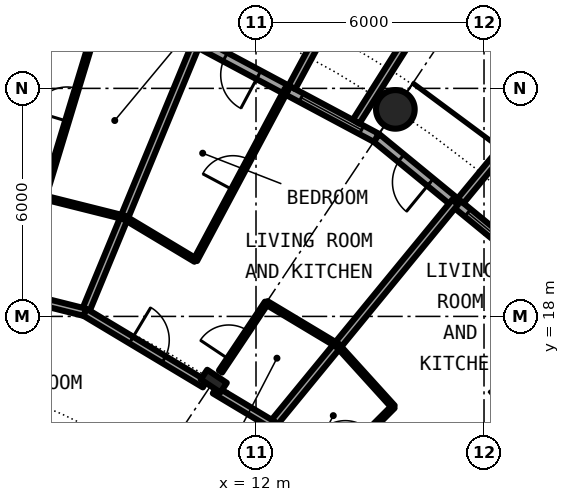
"""IFC4 building model, lengths in metres.
Left out: names, types, materials, properties, quantities, classifications, styles, units other than length and angle.
Written with IfcOpenShell. Run it as: python <this file> out.ifc"""

import sys

from ifc_helpers import new_model, si_unit, direction, frame, frame_2d, origin, origin_2d, place, context, subcontext, project, spatial, rectangle, hollow_circle, i_section, extrude, element, fill, save


model = new_model("IFC4")
c1 = context("Model", 3, precision=1e-05, world=origin(), true_north=direction((0.0, 1.0)))
c2 = subcontext(c1, "Body", "Model", "MODEL_VIEW")
j1 = project(units=[si_unit("LENGTHUNIT", "METRE"), si_unit("PLANEANGLEUNIT", "RADIAN")], contexts=[c1])
p1 = place(None, origin())
s1 = spatial("IfcSite", under=j1, at=p1, CompositionType="ELEMENT")
p2 = place(p1, origin())
s2 = spatial("IfcBuilding", under=s1, at=p2, CompositionType="ELEMENT")
p3 = place(p2, frame((0.0, 0.0, 28.9)))
s3 = spatial("IfcBuildingStorey", under=s2, at=p3, CompositionType="ELEMENT", Elevation=28.9)
p4 = place(p3, frame((15.667, 23.448, 0.0), z_axis=(0.0, 0.0, 1.0), x_axis=(1.0, 0.0, 0.0)))
e1 = element("IfcColumn", 1, at=p4, inside=s3, PredefinedType="COLUMN", context=c2, shape_type="SweptSolid", body=[
    extrude(hollow_circle(Radius=0.508, WallThickness=0.05, at=origin_2d()), origin(), (0.0, 0.0, 1.0), 3.05),
])
p5 = place(p3, frame((10.889, 16.297, 0.0), z_axis=(0.0, 0.0, 1.0), x_axis=(0.55557023302, 0.831469612303, 0.0)))
e2 = element("IfcColumn", 2, at=p5, inside=s3, PredefinedType="COLUMN", context=c2, shape_type="SweptSolid", body=[
    extrude(i_section(OverallWidth=0.305, OverallDepth=0.62, WebThickness=0.021, FlangeThickness=0.04, FilletRadius=0.027, at=origin_2d()), origin(), (0.0, 0.0, 1.0), 3.05),
])
p6 = place(p3, frame((19.304, 19.304, 0.0), z_axis=(0.0, 0.0, 1.0), x_axis=(-0.773019449054, 0.634382322723, 0.0)))
e3 = element("IfcWall", 3, at=p6, inside=s3, PredefinedType="SOLIDWALL", context=c2, shape_type="SweptSolid", body=[
    extrude(rectangle(XDim=5.352, YDim=0.25, at=frame_2d((2.676, 0.0))), origin(), (0.0, 0.0, 1.0), 2.7),
])
p7 = place(p6, frame((0.441, 0.0, 0.3)))
e4 = element("IfcOpeningElement", 4, at=p7, cuts=e3, PredefinedType="OPENING", context=c2, shape_type="SweptSolid", body=[
    extrude(rectangle(XDim=1.8, YDim=2.1, at=frame_2d((0.9, 1.05))), frame((0.0, 0.135, 0.0), z_axis=(0.0, -1.0, 0.0), x_axis=(1.0, 0.0, 0.0)), (0.0, 0.0, 1.0), 0.27),
])
p8 = place(p6, frame((3.51, 0.0, 0.0)))
e5 = element("IfcOpeningElement", 5, at=p8, cuts=e3, PredefinedType="OPENING", context=c2, shape_type="SweptSolid", body=[
    extrude(rectangle(XDim=1.0, YDim=2.2, at=frame_2d((0.5, 1.1))), frame((0.0, 0.135, 0.0), z_axis=(0.0, -1.0, 0.0), x_axis=(1.0, 0.0, 0.0)), (0.0, 0.0, 1.0), 0.27),
])
p9 = place(p3, frame((17.384, 21.041, -0.03), z_axis=(0.0, 0.0, 1.0), x_axis=(0.63709551667, 0.770784861449, 0.0)))
e6 = element("IfcWall", 6, at=p9, inside=s3, PredefinedType="SOLIDWALL", context=c2, shape_type="SweptSolid", body=[
    extrude(rectangle(XDim=3.006, YDim=0.2, at=frame_2d((1.503, 0.0))), origin(), (0.0, 0.0, 1.0), 2.73),
])
p10 = place(p3, frame((15.167, 22.699, 0.0), z_axis=(0.0, 0.0, 1.0), x_axis=(-0.881915646801, 0.471407246368, 0.0)))
e7 = element("IfcWall", 7, at=p10, inside=s3, PredefinedType="SOLIDWALL", context=c2, shape_type="SweptSolid", body=[
    extrude(rectangle(XDim=5.352, YDim=0.25, at=frame_2d((2.676, 0.0))), origin(), (0.0, 0.0, 1.0), 2.7),
])
p11 = place(p10, frame((0.441, 0.0, 0.3)))
e8 = element("IfcOpeningElement", 8, at=p11, cuts=e7, PredefinedType="OPENING", context=c2, shape_type="SweptSolid", body=[
    extrude(rectangle(XDim=1.8, YDim=2.1, at=frame_2d((0.9, 1.05))), frame((0.0, 0.135, 0.0), z_axis=(0.0, -1.0, 0.0), x_axis=(1.0, 0.0, 0.0)), (0.0, 0.0, 1.0), 0.27),
])
p12 = place(p10, frame((3.51, 0.0, 0.0)))
e9 = element("IfcOpeningElement", 9, at=p12, cuts=e7, PredefinedType="OPENING", context=c2, shape_type="SweptSolid", body=[
    extrude(rectangle(XDim=1.0, YDim=2.2, at=frame_2d((0.5, 1.1))), frame((0.0, 0.135, 0.0), z_axis=(0.0, -1.0, 0.0), x_axis=(1.0, 0.0, 0.0)), (0.0, 0.0, 1.0), 0.27),
])
p13 = place(p3, frame((14.635, 23.126, -0.03), z_axis=(0.0, 0.0, 1.0), x_axis=(0.534437802731, 0.845207805816, 0.0)))
e10 = element("IfcWall", 10, at=p13, inside=s3, PredefinedType="SOLIDWALL", context=c2, shape_type="SweptSolid", body=[
    extrude(rectangle(XDim=2.932, YDim=0.2, at=frame_2d((1.466, 0.0))), origin(), (0.0, 0.0, 1.0), 2.73),
])
p14 = place(p3, frame((12.945, 24.029, -0.03), z_axis=(0.0, 0.0, 1.0), x_axis=(0.474424310775, 0.88029629861, 0.0)))
e11 = element("IfcWall", 11, at=p14, inside=s3, PredefinedType="SOLIDWALL", context=c2, shape_type="SweptSolid", body=[
    extrude(rectangle(XDim=3.006, YDim=0.2, at=frame_2d((1.503, 0.0))), origin(), (0.0, 0.0, 1.0), 2.73),
])
p15 = place(p3, frame((6.418, 21.133, 0.0), z_axis=(0.0, 0.0, 1.0), x_axis=(0.290651827018, 0.956828885147, 0.0)))
e12 = element("IfcWall", 12, at=p15, inside=s3, PredefinedType="PARTITIONING", context=c2, shape_type="SweptSolid", body=[
    extrude(rectangle(XDim=5.089, YDim=0.1, at=frame_2d((2.544, 0.0))), origin(), (0.0, 0.0, 1.0), 2.7),
])
p16 = place(p15, frame((2.094, 0.0, 0.0)))
e13 = element("IfcOpeningElement", 13, at=p16, cuts=e12, PredefinedType="OPENING", context=c2, shape_type="SweptSolid", body=[
    extrude(rectangle(XDim=0.9, YDim=2.3, at=frame_2d((0.45, 1.15))), frame((0.0, 0.06, 0.0), z_axis=(0.0, -1.0, 0.0), x_axis=(1.0, 0.0, 0.0)), (0.0, 0.0, 1.0), 0.12),
])
p17 = place(p3, frame((7.501, 18.108, 0.0), z_axis=(0.0, 0.0, 1.0), x_axis=(0.382490346157, 0.923959487801, 0.0)))
e14 = element("IfcWall", 14, at=p17, inside=s3, PredefinedType="PARTITIONING", context=c2, shape_type="SweptSolid", body=[
    extrude(rectangle(XDim=7.574, YDim=0.2, at=frame_2d((3.787, 0.0))), origin(), (0.0, 0.0, 1.0), 2.7),
])
p18 = place(p3, frame((10.405, 19.481, 0.0), z_axis=(0.0, 0.0, 1.0), x_axis=(0.471170755767, 0.882042016522, 0.0)))
e15 = element("IfcWall", 15, at=p18, inside=s3, PredefinedType="PARTITIONING", context=c2, shape_type="SweptSolid", body=[
    extrude(rectangle(XDim=5.089, YDim=0.1, at=frame_2d((2.545, 0.0))), origin(), (0.0, 0.0, 1.0), 2.7),
])
p19 = place(p18, frame((2.095, 0.0, 0.0)))
e16 = element("IfcOpeningElement", 16, at=p19, cuts=e15, PredefinedType="OPENING", context=c2, shape_type="SweptSolid", body=[
    extrude(rectangle(XDim=0.9, YDim=2.3, at=frame_2d((0.45, 1.15))), frame((0.0, 0.06, 0.0), z_axis=(0.0, -1.0, 0.0), x_axis=(1.0, 0.0, 0.0)), (0.0, 0.0, 1.0), 0.12),
])
p20 = place(p3, frame((11.067, 16.551, 0.0), z_axis=(0.0, 0.0, 1.0), x_axis=(0.55563200073, 0.831428337119, 0.0)))
e17 = element("IfcWall", 17, at=p20, inside=s3, PredefinedType="PARTITIONING", context=c2, shape_type="SweptSolid", body=[
    extrude(rectangle(XDim=2.176, YDim=0.1, at=frame_2d((1.088, 0.0))), origin(), (0.0, 0.0, 1.0), 2.7),
])
p21 = place(p20, frame((0.389, 0.0, 0.0)))
e18 = element("IfcOpeningElement", 18, at=p21, cuts=e17, PredefinedType="OPENING", context=c2, shape_type="SweptSolid", body=[
    extrude(rectangle(XDim=0.9, YDim=2.3, at=frame_2d((0.45, 1.15))), frame((0.0, 0.06, 0.0), z_axis=(0.0, -1.0, 0.0), x_axis=(1.0, 0.0, 0.0)), (0.0, 0.0, 1.0), 0.12),
])
p22 = place(p3, frame((12.434, 15.151, 0.0), z_axis=(0.0, 0.0, 1.0), x_axis=(0.634381303318, 0.773020285633, 0.0)))
e19 = element("IfcWall", 19, at=p22, inside=s3, PredefinedType="PARTITIONING", context=c2, shape_type="SweptSolid", body=[
    extrude(rectangle(XDim=7.576, YDim=0.2, at=frame_2d((3.788, 0.0))), origin(), (0.0, 0.0, 1.0), 2.7),
])
p23 = place(p3, frame((13.722, 13.73, 0.0), z_axis=(0.0, 0.0, 1.0), x_axis=(0.706741540154, 0.707471833659, 0.0)))
e20 = element("IfcWall", 20, at=p23, inside=s3, PredefinedType="PARTITIONING", context=c2, shape_type="SweptSolid", body=[
    extrude(rectangle(XDim=2.674, YDim=0.1, at=frame_2d((1.337, 0.0))), origin(), (0.0, 0.0, 1.0), 2.7),
])
p24 = place(p23, frame((0.887, 0.0, 0.0)))
e21 = element("IfcOpeningElement", 21, at=p24, cuts=e20, PredefinedType="OPENING", context=c2, shape_type="SweptSolid", body=[
    extrude(rectangle(XDim=0.9, YDim=2.3, at=frame_2d((0.45, 1.15))), frame((0.0, 0.06, 0.0), z_axis=(0.0, -1.0, 0.0), x_axis=(1.0, 0.0, 0.0)), (0.0, 0.0, 1.0), 0.12),
])
p25 = place(p3, frame((17.077, 14.006, 0.0), z_axis=(0.0, 0.0, 1.0), x_axis=(0.77326214499, 0.634086472908, 0.0)))
e22 = element("IfcWall", 22, at=p25, inside=s3, PredefinedType="PARTITIONING", context=c2, shape_type="SweptSolid", body=[
    extrude(rectangle(XDim=5.089, YDim=0.1, at=frame_2d((2.544, 0.0))), origin(), (0.0, 0.0, 1.0), 2.7),
])
p26 = place(p25, frame((2.094, 0.0, 0.0)))
e23 = element("IfcOpeningElement", 23, at=p26, cuts=e22, PredefinedType="OPENING", context=c2, shape_type="SweptSolid", body=[
    extrude(rectangle(XDim=0.9, YDim=2.3, at=frame_2d((0.45, 1.15))), frame((0.0, 0.06, 0.0), z_axis=(0.0, -1.0, 0.0), x_axis=(1.0, 0.0, 0.0)), (0.0, 0.0, 1.0), 0.12),
])
p27 = place(p3, frame((3.299, 16.574, 0.0), z_axis=(0.0, 0.0, 1.0), x_axis=(0.831465254975, -0.555576754166, 0.0)))
e24 = element("IfcWall", 24, at=p27, inside=s3, PredefinedType="PARTITIONING", context=c2, shape_type="SweptSolid", body=[
    extrude(rectangle(XDim=12.915, YDim=0.2, at=frame_2d((6.457, 0.0))), origin(), (0.0, 0.0, 1.0), 2.7),
])
p28 = place(p27, frame((4.346, 0.0, 0.0)))
e25 = element("IfcOpeningElement", 25, at=p28, cuts=e24, PredefinedType="OPENING", context=c2, shape_type="SweptSolid", body=[
    extrude(rectangle(XDim=1.0, YDim=2.3, at=frame_2d((0.5, 1.15))), frame((0.0, 0.11, 0.0), z_axis=(0.0, -1.0, 0.0), x_axis=(1.0, 0.0, 0.0)), (0.0, 0.0, 1.0), 0.22),
])
p29 = place(p3, frame((3.935, 19.001, 0.0), z_axis=(0.0, 0.0, 1.0), x_axis=(0.970040840928, -0.242941900323, 0.0)))
e26 = element("IfcWall", 26, at=p29, inside=s3, PredefinedType="PARTITIONING", context=c2, shape_type="SweptSolid", body=[
    extrude(rectangle(XDim=3.676, YDim=0.2, at=frame_2d((1.838, 0.0))), origin(), (0.0, 0.0, 1.0), 2.38),
])
p30 = place(p29, frame((1.259, 0.0, 0.0)))
e27 = element("IfcOpeningElement", 27, at=p30, cuts=e26, PredefinedType="OPENING", context=c2, shape_type="SweptSolid", body=[
    extrude(rectangle(XDim=1.0, YDim=2.3, at=frame_2d((0.5, 1.15))), frame((0.0, 0.11, 0.0), z_axis=(0.0, -1.0, 0.0), x_axis=(1.0, 0.0, 0.0)), (0.0, 0.0, 1.0), 0.22),
])
p31 = place(p3, frame((7.501, 18.108, 0.0), z_axis=(0.0, 0.0, 1.0), x_axis=(0.857656999296, -0.514222200569, 0.0)))
e28 = element("IfcWall", 28, at=p31, inside=s3, PredefinedType="PARTITIONING", context=c2, shape_type="SweptSolid", body=[
    extrude(rectangle(XDim=3.675, YDim=0.2, at=frame_2d((1.838, 0.0))), origin(), (0.0, 0.0, 1.0), 2.38),
])
p32 = place(p31, frame((1.418, 0.0, 0.0)))
e29 = element("IfcOpeningElement", 29, at=p32, cuts=e28, PredefinedType="OPENING", context=c2, shape_type="SweptSolid", body=[
    extrude(rectangle(XDim=1.0, YDim=2.3, at=frame_2d((0.5, 1.15))), frame((0.0, 0.11, 0.0), z_axis=(0.0, -1.0, 0.0), x_axis=(1.0, 0.0, 0.0)), (0.0, 0.0, 1.0), 0.22),
])
p33 = place(p3, frame((10.915, 16.061, 0.0), z_axis=(0.0, 0.0, 1.0), x_axis=(0.857809047014, -0.513968519329, 0.0)))
e30 = element("IfcWall", 30, at=p33, inside=s3, PredefinedType="PARTITIONING", context=c2, shape_type="SweptSolid", body=[
    extrude(rectangle(XDim=1.771, YDim=0.2, at=frame_2d((0.885, 0.0))), origin(), (0.0, 0.0, 1.0), 2.38),
])
p34 = place(p3, frame((6.418, 21.133, 0.0), z_axis=(0.0, 0.0, 1.0), x_axis=(0.97003047456, -0.242983288366, 0.0)))
e31 = element("IfcWall", 31, at=p34, inside=s3, PredefinedType="PARTITIONING", context=c2, shape_type="SweptSolid", body=[
    extrude(rectangle(XDim=2.181, YDim=0.1, at=frame_2d((1.091, 0.0))), origin(), (0.0, 0.0, 1.0), 2.7),
])
for number, where, z_axis, x_axis in (
    (32, (8.534, 20.603, 0.0), (0.0, 0.0, 1.0), (0.858, -0.514, 0.0)),
    (33, (12.276, 18.359, 0.0), (0.0, 0.0, 1.0), (0.858, -0.514, 0.0)),
):
    element("IfcWall", number, at=place(p3, frame(where, z_axis=z_axis, x_axis=x_axis)), inside=s3, PredefinedType="PARTITIONING", context=c2, shape_type="SweptSolid", body=[
        extrude(rectangle(XDim=2.182, YDim=0.1, at=frame_2d((1.091, 0.0))), origin(), (0.0, 0.0, 1.0), 2.7),
    ])
p35 = place(p3, frame((14.147, 17.238, 0.0), z_axis=(0.0, 0.0, 1.0), x_axis=(0.671674967707, -0.740845960882, 0.0)))
e34 = element("IfcWall", 34, at=p35, inside=s3, PredefinedType="PARTITIONING", context=c2, shape_type="SweptSolid", body=[
    extrude(rectangle(XDim=2.181, YDim=0.1, at=frame_2d((1.091, 0.0))), origin(), (0.0, 0.0, 1.0), 2.7),
])
p36 = place(p7, origin())
e35 = element("IfcWindow", 35, at=p36, inside=s3, PartitioningType="SINGLE_PANEL", PredefinedType="WINDOW", context=c2, shape_type="SweptSolid", body=[
    extrude(rectangle(XDim=1.8, YDim=2.1, at=frame_2d((0.9, 1.05))), frame((0.0, 0.03, 0.0), z_axis=(0.0, -1.0, 0.0), x_axis=(1.0, 0.0, 0.0)), (0.0, 0.0, 1.0), 0.06),
])
fill(e4, e35)
p37 = place(p8, origin())
e36 = element("IfcDoor", 36, at=p37, inside=s3, OperationType="SINGLE_SWING_LEFT", PredefinedType="DOOR", context=c2, shape_type="SweptSolid", body=[
    extrude(rectangle(XDim=1.0, YDim=2.2, at=frame_2d((0.5, 1.1))), frame((0.0, 0.025, 0.0), z_axis=(0.0, -1.0, 0.0), x_axis=(1.0, 0.0, 0.0)), (0.0, 0.0, 1.0), 0.05),
])
fill(e5, e36)
p38 = place(p11, origin())
e37 = element("IfcWindow", 37, at=p38, inside=s3, PartitioningType="SINGLE_PANEL", PredefinedType="WINDOW", context=c2, shape_type="SweptSolid", body=[
    extrude(rectangle(XDim=1.8, YDim=2.1, at=frame_2d((0.9, 1.05))), frame((0.0, 0.03, 0.0), z_axis=(0.0, -1.0, 0.0), x_axis=(1.0, 0.0, 0.0)), (0.0, 0.0, 1.0), 0.06),
])
fill(e8, e37)
p39 = place(p12, origin())
e38 = element("IfcDoor", 38, at=p39, inside=s3, OperationType="SINGLE_SWING_LEFT", PredefinedType="DOOR", context=c2, shape_type="SweptSolid", body=[
    extrude(rectangle(XDim=1.0, YDim=2.2, at=frame_2d((0.5, 1.1))), frame((0.0, 0.025, 0.0), z_axis=(0.0, -1.0, 0.0), x_axis=(1.0, 0.0, 0.0)), (0.0, 0.0, 1.0), 0.05),
])
fill(e9, e38)
p40 = place(p32, origin())
e39 = element("IfcDoor", 39, at=p40, inside=s3, OperationType="SINGLE_SWING_RIGHT", PredefinedType="DOOR", context=c2, shape_type="SweptSolid", body=[
    extrude(rectangle(XDim=1.0, YDim=2.3, at=frame_2d((0.5, 1.15))), frame((0.0, 0.025, 0.0), z_axis=(0.0, -1.0, 0.0), x_axis=(1.0, 0.0, 0.0)), (0.0, 0.0, 1.0), 0.05),
])
fill(e29, e39)
p41 = place(p21, origin())
e40 = element("IfcDoor", 40, at=p41, inside=s3, OperationType="SINGLE_SWING_LEFT", PredefinedType="DOOR", context=c2, shape_type="SweptSolid", body=[
    extrude(rectangle(XDim=0.9, YDim=2.3, at=frame_2d((0.45, 1.15))), frame((0.0, 0.025, 0.0), z_axis=(0.0, -1.0, 0.0), x_axis=(1.0, 0.0, 0.0)), (0.0, 0.0, 1.0), 0.05),
])
fill(e18, e40)
p42 = place(p19, origin())
e41 = element("IfcDoor", 41, at=p42, inside=s3, OperationType="SINGLE_SWING_RIGHT", PredefinedType="DOOR", context=c2, shape_type="SweptSolid", body=[
    extrude(rectangle(XDim=0.9, YDim=2.3, at=frame_2d((0.45, 1.15))), frame((0.0, 0.025, 0.0), z_axis=(0.0, -1.0, 0.0), x_axis=(1.0, 0.0, 0.0)), (0.0, 0.0, 1.0), 0.05),
])
fill(e16, e41)
p43 = place(p16, origin())
e42 = element("IfcDoor", 42, at=p43, inside=s3, OperationType="SINGLE_SWING_LEFT", PredefinedType="DOOR", context=c2, shape_type="SweptSolid", body=[
    extrude(rectangle(XDim=0.9, YDim=2.3, at=frame_2d((0.45, 1.15))), frame((0.0, 0.025, 0.0), z_axis=(0.0, -1.0, 0.0), x_axis=(1.0, 0.0, 0.0)), (0.0, 0.0, 1.0), 0.05),
])
fill(e13, e42)
save(model, sys.argv[1])
